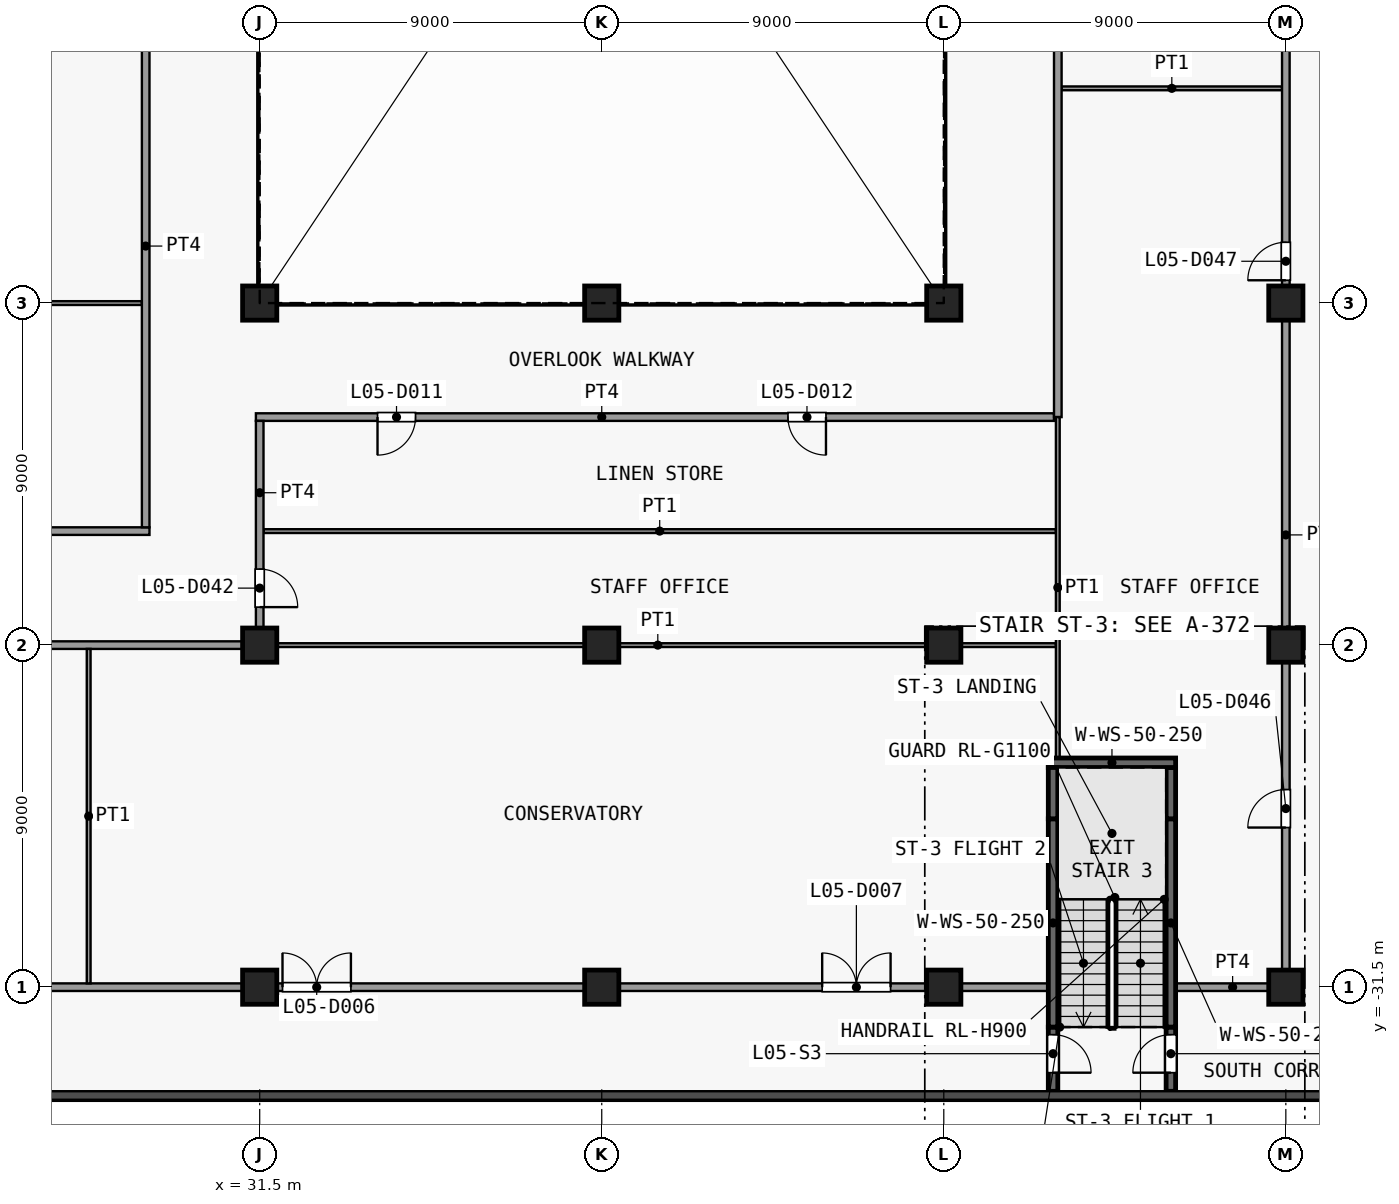
"""IFC4 building model, lengths in metres.
Left out: names, types, materials, properties, quantities, classifications, styles, units other than length and angle.
Written with IfcOpenShell. Run it as: python <this file> out.ifc"""

import sys

from ifc_helpers import new_model, si_unit, direction, frame, frame_2d, origin, origin_2d, place, context, subcontext, project, spatial, rectangle, extrude, element, fill, save


model = new_model("IFC4")
c1 = context("Model", 3, precision=1e-05, world=origin(), true_north=direction((0.0, 1.0)))
c2 = subcontext(c1, "Body", "Model", "MODEL_VIEW")
j1 = project(units=[si_unit("LENGTHUNIT", "METRE"), si_unit("PLANEANGLEUNIT", "RADIAN")], contexts=[c1])
p1 = place(None, origin())
s1 = spatial("IfcSite", under=j1, at=p1, CompositionType="ELEMENT")
p2 = place(p1, origin())
s2 = spatial("IfcBuilding", under=s1, at=p2, CompositionType="ELEMENT")
p3 = place(p2, frame((0.0, 0.0, 28.0)))
s3 = spatial("IfcBuildingStorey", under=s2, at=p3, CompositionType="ELEMENT", Elevation=28.0)
for number, where, z_axis, x_axis in (
    (1, (31.5, -31.5, 0.0), (0.0, 0.0, 1.0), (1.0, 0.0, 0.0)),
    (2, (31.5, -22.5, 0.0), (0.0, 0.0, 1.0), (1.0, 0.0, 0.0)),
    (3, (31.5, -13.5, 0.0), (0.0, 0.0, 1.0), (1.0, 0.0, 0.0)),
    (4, (40.5, -31.5, 0.0), (0.0, 0.0, 1.0), (1.0, 0.0, 0.0)),
    (5, (40.5, -22.5, 0.0), (0.0, 0.0, 1.0), (1.0, 0.0, 0.0)),
    (6, (40.5, -13.5, 0.0), (0.0, 0.0, 1.0), (1.0, 0.0, 0.0)),
    (7, (49.5, -31.5, 0.0), (0.0, 0.0, 1.0), (1.0, 0.0, 0.0)),
    (8, (49.5, -22.5, 0.0), (0.0, 0.0, 1.0), (1.0, 0.0, 0.0)),
    (9, (49.5, -13.5, 0.0), (0.0, 0.0, 1.0), (1.0, 0.0, 0.0)),
    (10, (58.5, -31.5, 0.0), (0.0, 0.0, 1.0), (1.0, 0.0, 0.0)),
    (11, (58.5, -22.5, 0.0), (0.0, 0.0, 1.0), (1.0, 0.0, 0.0)),
    (12, (58.5, -13.5, 0.0), (0.0, 0.0, 1.0), (1.0, 0.0, 0.0)),
):
    element("IfcColumn", number, at=place(p3, frame(where, z_axis=z_axis, x_axis=x_axis)), inside=s3, PredefinedType="COLUMN", context=c2, shape_type="SweptSolid", body=[
        extrude(rectangle(XDim=0.9, YDim=0.9, at=origin_2d()), origin(), (0.0, 0.0, 1.0), 4.5),
    ])
p4 = place(p3, frame((52.375, -32.55, 0.0), z_axis=(0.0, 0.0, 1.0), x_axis=(0.0, -1.0, 0.0)))
e13 = element("IfcWall", 13, at=p4, inside=s3, PredefinedType="SHEAR", context=c2, shape_type="SweptSolid", body=[
    extrude(rectangle(XDim=1.69, YDim=0.25, at=frame_2d((0.845, 0.0))), origin(), (0.0, 0.0, 1.0), 4.1),
])
p5 = place(p4, frame((0.2, 0.0, 0.0)))
e14 = element("IfcOpeningElement", 14, at=p5, cuts=e13, PredefinedType="OPENING", context=c2, shape_type="SweptSolid", body=[
    extrude(rectangle(XDim=1.0, YDim=2.1, at=frame_2d((0.5, 1.05))), frame((0.0, 0.135, 0.0), z_axis=(0.0, -1.0, 0.0), x_axis=(1.0, 0.0, 0.0)), (0.0, 0.0, 1.0), 0.27),
])
p6 = place(p3, frame((52.375, -32.55, 0.0), z_axis=(0.0, 0.0, 1.0), x_axis=(0.0, 1.0, 0.0)))
e15 = element("IfcWall", 15, at=p6, inside=s3, PredefinedType="SHEAR", context=c2, shape_type="SweptSolid", body=[
    extrude(rectangle(XDim=5.48, YDim=0.25, at=frame_2d((2.74, 0.0))), origin(), (0.0, 0.0, 1.0), 4.1),
])
p7 = place(p3, frame((52.375, -27.07, 0.0), z_axis=(0.0, 0.0, 1.0), x_axis=(0.0, 1.0, 0.0)))
e16 = element("IfcWall", 16, at=p7, inside=s3, PredefinedType="SHEAR", context=c2, shape_type="SweptSolid", body=[
    extrude(rectangle(XDim=1.35, YDim=0.25, at=frame_2d((0.675, 0.0))), origin(), (0.0, 0.0, 1.0), 4.1),
])
p8 = place(p3, frame((55.475, -34.24, 0.0), z_axis=(0.0, 0.0, 1.0), x_axis=(0.0, 1.0, 0.0)))
e17 = element("IfcWall", 17, at=p8, inside=s3, PredefinedType="SHEAR", context=c2, shape_type="SweptSolid", body=[
    extrude(rectangle(XDim=1.69, YDim=0.25, at=frame_2d((0.845, 0.0))), origin(), (0.0, 0.0, 1.0), 4.1),
])
p9 = place(p8, frame((0.49, 0.0, 0.0)))
e18 = element("IfcOpeningElement", 18, at=p9, cuts=e17, PredefinedType="OPENING", context=c2, shape_type="SweptSolid", body=[
    extrude(rectangle(XDim=1.0, YDim=2.1, at=frame_2d((0.5, 1.05))), frame((0.0, 0.135, 0.0), z_axis=(0.0, -1.0, 0.0), x_axis=(1.0, 0.0, 0.0)), (0.0, 0.0, 1.0), 0.27),
])
p10 = place(p3, frame((55.475, -32.55, 0.0), z_axis=(0.0, 0.0, 1.0), x_axis=(0.0, 1.0, 0.0)))
e19 = element("IfcWall", 19, at=p10, inside=s3, PredefinedType="SHEAR", context=c2, shape_type="SweptSolid", body=[
    extrude(rectangle(XDim=5.48, YDim=0.25, at=frame_2d((2.74, 0.0))), origin(), (0.0, 0.0, 1.0), 4.1),
])
p11 = place(p3, frame((55.475, -27.07, 0.0), z_axis=(0.0, 0.0, 1.0), x_axis=(0.0, 1.0, 0.0)))
e20 = element("IfcWall", 20, at=p11, inside=s3, PredefinedType="SHEAR", context=c2, shape_type="SweptSolid", body=[
    extrude(rectangle(XDim=1.35, YDim=0.25, at=frame_2d((0.675, 0.0))), origin(), (0.0, 0.0, 1.0), 4.1),
])
p12 = place(p3, frame((52.25, -25.595, 0.0), z_axis=(0.0, 0.0, 1.0), x_axis=(1.0, 0.0, 0.0)))
e21 = element("IfcWall", 21, at=p12, inside=s3, PredefinedType="SHEAR", context=c2, shape_type="SweptSolid", body=[
    extrude(rectangle(XDim=3.35, YDim=0.25, at=frame_2d((1.675, 0.0))), origin(), (0.0, 0.0, 1.0), 4.1),
])
p13 = place(p3, frame((-25.9, -31.5, 0.0), z_axis=(0.0, 0.0, 1.0), x_axis=(1.0, 0.0, 0.0)))
e22 = element("IfcWall", 22, at=p13, inside=s3, PredefinedType="PARTITIONING", context=c2, shape_type="SweptSolid", body=[
    extrude(rectangle(XDim=78.15, YDim=0.2, at=frame_2d((39.075, 0.0))), origin(), (0.0, 0.0, 1.0), 4.1),
])
p14 = place(p13, frame((5.1, 0.0, 0.0)))
e23 = element("IfcOpeningElement", 23, at=p14, cuts=e22, PredefinedType="OPENING", context=c2, shape_type="SweptSolid", body=[
    extrude(rectangle(XDim=1.0, YDim=2.1, at=frame_2d((0.5, 1.05))), frame((0.0, 0.11, 0.0), z_axis=(0.0, -1.0, 0.0), x_axis=(1.0, 0.0, 0.0)), (0.0, 0.0, 1.0), 0.22),
])
p15 = place(p13, frame((22.0, 0.0, 0.0)))
e24 = element("IfcOpeningElement", 24, at=p15, cuts=e22, PredefinedType="OPENING", context=c2, shape_type="SweptSolid", body=[
    extrude(rectangle(XDim=1.0, YDim=2.1, at=frame_2d((0.5, 1.05))), frame((0.0, 0.11, 0.0), z_axis=(0.0, -1.0, 0.0), x_axis=(1.0, 0.0, 0.0)), (0.0, 0.0, 1.0), 0.22),
])
p16 = place(p13, frame((31.0, 0.0, 0.0)))
e25 = element("IfcOpeningElement", 25, at=p16, cuts=e22, PredefinedType="OPENING", context=c2, shape_type="SweptSolid", body=[
    extrude(rectangle(XDim=1.0, YDim=2.1, at=frame_2d((0.5, 1.05))), frame((0.0, 0.11, 0.0), z_axis=(0.0, -1.0, 0.0), x_axis=(1.0, 0.0, 0.0)), (0.0, 0.0, 1.0), 0.22),
])
p17 = place(p13, frame((34.8, 0.0, 0.0)))
e26 = element("IfcOpeningElement", 26, at=p17, cuts=e22, PredefinedType="OPENING", context=c2, shape_type="SweptSolid", body=[
    extrude(rectangle(XDim=1.0, YDim=2.1, at=frame_2d((0.5, 1.05))), frame((0.0, 0.11, 0.0), z_axis=(0.0, -1.0, 0.0), x_axis=(1.0, 0.0, 0.0)), (0.0, 0.0, 1.0), 0.22),
])
p18 = place(p13, frame((45.1, 0.0, 0.0)))
e27 = element("IfcOpeningElement", 27, at=p18, cuts=e22, PredefinedType="OPENING", context=c2, shape_type="SweptSolid", body=[
    extrude(rectangle(XDim=1.0, YDim=2.1, at=frame_2d((0.5, 1.05))), frame((0.0, 0.11, 0.0), z_axis=(0.0, -1.0, 0.0), x_axis=(1.0, 0.0, 0.0)), (0.0, 0.0, 1.0), 0.22),
])
p19 = place(p13, frame((58.0, 0.0, 0.0)))
e28 = element("IfcOpeningElement", 28, at=p19, cuts=e22, PredefinedType="OPENING", context=c2, shape_type="SweptSolid", body=[
    extrude(rectangle(XDim=1.8, YDim=2.1, at=frame_2d((0.9, 1.05))), frame((0.0, 0.11, 0.0), z_axis=(0.0, -1.0, 0.0), x_axis=(1.0, 0.0, 0.0)), (0.0, 0.0, 1.0), 0.22),
])
p20 = place(p13, frame((72.2, 0.0, 0.0)))
e29 = element("IfcOpeningElement", 29, at=p20, cuts=e22, PredefinedType="OPENING", context=c2, shape_type="SweptSolid", body=[
    extrude(rectangle(XDim=1.8, YDim=2.1, at=frame_2d((0.9, 1.05))), frame((0.0, 0.11, 0.0), z_axis=(0.0, -1.0, 0.0), x_axis=(1.0, 0.0, 0.0)), (0.0, 0.0, 1.0), 0.22),
])
p21 = place(p3, frame((55.6, -31.5, 0.0), z_axis=(0.0, 0.0, 1.0), x_axis=(1.0, 0.0, 0.0)))
e30 = element("IfcWall", 30, at=p21, inside=s3, PredefinedType="PARTITIONING", context=c2, shape_type="SweptSolid", body=[
    extrude(rectangle(XDim=3.0, YDim=0.2, at=frame_2d((1.5, 0.0))), origin(), (0.0, 0.0, 1.0), 4.1),
])
p22 = place(p3, frame((17.4, -22.5, 0.0), z_axis=(0.0, 0.0, 1.0), x_axis=(1.0, 0.0, 0.0)))
e31 = element("IfcWall", 31, at=p22, inside=s3, PredefinedType="PARTITIONING", context=c2, shape_type="SweptSolid", body=[
    extrude(rectangle(XDim=14.1, YDim=0.2, at=frame_2d((7.05, 0.0))), origin(), (0.0, 0.0, 1.0), 4.1),
])
p23 = place(p3, frame((31.5, -22.5, 0.0), z_axis=(0.0, 0.0, 1.0), x_axis=(1.0, 0.0, 0.0)))
e32 = element("IfcWall", 32, at=p23, inside=s3, PredefinedType="PARTITIONING", context=c2, shape_type="SweptSolid", body=[
    extrude(rectangle(XDim=20.95, YDim=0.1, at=frame_2d((10.475, 0.0))), origin(), (0.0, 0.0, 1.0), 4.1),
])
p24 = place(p3, frame((13.5, -19.5, 0.0), z_axis=(0.0, 0.0, 1.0), x_axis=(1.0, 0.0, 0.0)))
e33 = element("IfcWall", 33, at=p24, inside=s3, PredefinedType="PARTITIONING", context=c2, shape_type="SweptSolid", body=[
    extrude(rectangle(XDim=15.1, YDim=0.2, at=frame_2d((7.55, 0.0))), origin(), (0.0, 0.0, 1.0), 4.1),
])
p25 = place(p24, frame((7.0, 0.0, 0.0)))
e34 = element("IfcOpeningElement", 34, at=p25, cuts=e33, PredefinedType="OPENING", context=c2, shape_type="SweptSolid", body=[
    extrude(rectangle(XDim=1.0, YDim=2.1, at=frame_2d((0.5, 1.05))), frame((0.0, 0.11, 0.0), z_axis=(0.0, -1.0, 0.0), x_axis=(1.0, 0.0, 0.0)), (0.0, 0.0, 1.0), 0.22),
])
p26 = place(p3, frame((31.6, -19.5, 0.0), z_axis=(0.0, 0.0, 1.0), x_axis=(1.0, 0.0, 0.0)))
e35 = element("IfcWall", 35, at=p26, inside=s3, PredefinedType="PARTITIONING", context=c2, shape_type="SweptSolid", body=[
    extrude(rectangle(XDim=20.85, YDim=0.1, at=frame_2d((10.425, 0.0))), origin(), (0.0, 0.0, 1.0), 4.1),
])
p27 = place(p3, frame((31.4, -16.5, 0.0), z_axis=(0.0, 0.0, 1.0), x_axis=(1.0, 0.0, 0.0)))
e36 = element("IfcWall", 36, at=p27, inside=s3, PredefinedType="PARTITIONING", context=c2, shape_type="SweptSolid", body=[
    extrude(rectangle(XDim=21.0, YDim=0.2, at=frame_2d((10.5, 0.0))), origin(), (0.0, 0.0, 1.0), 4.1),
])
p28 = place(p27, frame((3.2, 0.0, 0.0)))
e37 = element("IfcOpeningElement", 37, at=p28, cuts=e36, PredefinedType="OPENING", context=c2, shape_type="SweptSolid", body=[
    extrude(rectangle(XDim=1.0, YDim=2.1, at=frame_2d((0.5, 1.05))), frame((0.0, 0.11, 0.0), z_axis=(0.0, -1.0, 0.0), x_axis=(1.0, 0.0, 0.0)), (0.0, 0.0, 1.0), 0.22),
])
p29 = place(p27, frame((14.0, 0.0, 0.0)))
e38 = element("IfcOpeningElement", 38, at=p29, cuts=e36, PredefinedType="OPENING", context=c2, shape_type="SweptSolid", body=[
    extrude(rectangle(XDim=1.0, YDim=2.1, at=frame_2d((0.5, 1.05))), frame((0.0, 0.11, 0.0), z_axis=(0.0, -1.0, 0.0), x_axis=(1.0, 0.0, 0.0)), (0.0, 0.0, 1.0), 0.22),
])
p30 = place(p3, frame((13.5, -13.5, 0.0), z_axis=(0.0, 0.0, 1.0), x_axis=(1.0, 0.0, 0.0)))
e39 = element("IfcWall", 39, at=p30, inside=s3, PredefinedType="PARTITIONING", context=c2, shape_type="SweptSolid", body=[
    extrude(rectangle(XDim=14.9, YDim=0.1, at=frame_2d((7.45, 0.0))), origin(), (0.0, 0.0, 1.0), 4.1),
])
p31 = place(p3, frame((52.6, -7.85, 0.0), z_axis=(0.0, 0.0, 1.0), x_axis=(1.0, 0.0, 0.0)))
e40 = element("IfcWall", 40, at=p31, inside=s3, PredefinedType="PARTITIONING", context=c2, shape_type="SweptSolid", body=[
    extrude(rectangle(XDim=5.8, YDim=0.1, at=frame_2d((2.9, 0.0))), origin(), (0.0, 0.0, 1.0), 4.1),
])
p32 = place(p3, frame((27.0, -31.4, 0.0), z_axis=(0.0, 0.0, 1.0), x_axis=(0.0, 1.0, 0.0)))
e41 = element("IfcWall", 41, at=p32, inside=s3, PredefinedType="PARTITIONING", context=c2, shape_type="SweptSolid", body=[
    extrude(rectangle(XDim=8.8, YDim=0.1, at=frame_2d((4.4, 0.0))), origin(), (0.0, 0.0, 1.0), 4.1),
])
p33 = place(p3, frame((28.5, -19.4, 0.0), z_axis=(0.0, 0.0, 1.0), x_axis=(0.0, 1.0, 0.0)))
e42 = element("IfcWall", 42, at=p33, inside=s3, PredefinedType="PARTITIONING", context=c2, shape_type="SweptSolid", body=[
    extrude(rectangle(XDim=14.8, YDim=0.2, at=frame_2d((7.4, 0.0))), origin(), (0.0, 0.0, 1.0), 4.1),
])
p34 = place(p3, frame((31.5, -22.4, 0.0), z_axis=(0.0, 0.0, 1.0), x_axis=(0.0, 1.0, 0.0)))
e43 = element("IfcWall", 43, at=p34, inside=s3, PredefinedType="PARTITIONING", context=c2, shape_type="SweptSolid", body=[
    extrude(rectangle(XDim=5.8, YDim=0.2, at=frame_2d((2.9, 0.0))), origin(), (0.0, 0.0, 1.0), 4.1),
])
p35 = place(p34, frame((0.9, 0.0, 0.0)))
e44 = element("IfcOpeningElement", 44, at=p35, cuts=e43, PredefinedType="OPENING", context=c2, shape_type="SweptSolid", body=[
    extrude(rectangle(XDim=1.0, YDim=2.1, at=frame_2d((0.5, 1.05))), frame((0.0, 0.11, 0.0), z_axis=(0.0, -1.0, 0.0), x_axis=(1.0, 0.0, 0.0)), (0.0, 0.0, 1.0), 0.22),
])
p36 = place(p3, frame((52.5, -16.5, 0.0), z_axis=(0.0, 0.0, 1.0), x_axis=(0.0, 1.0, 0.0)))
e45 = element("IfcWall", 45, at=p36, inside=s3, PredefinedType="PARTITIONING", context=c2, shape_type="SweptSolid", body=[
    extrude(rectangle(XDim=32.2, YDim=0.2, at=frame_2d((16.1, 0.0))), origin(), (0.0, 0.0, 1.0), 4.1),
])
p37 = place(p3, frame((52.5, -25.47, 0.0), z_axis=(0.0, 0.0, 1.0), x_axis=(0.0, 1.0, 0.0)))
e46 = element("IfcWall", 46, at=p37, inside=s3, PredefinedType="PARTITIONING", context=c2, shape_type="SweptSolid", body=[
    extrude(rectangle(XDim=8.97, YDim=0.1, at=frame_2d((4.485, 0.0))), origin(), (0.0, 0.0, 1.0), 4.1),
])
p38 = place(p3, frame((58.5, -31.4, 0.0), z_axis=(0.0, 0.0, 1.0), x_axis=(0.0, 1.0, 0.0)))
e47 = element("IfcWall", 47, at=p38, inside=s3, PredefinedType="PARTITIONING", context=c2, shape_type="SweptSolid", body=[
    extrude(rectangle(XDim=47.1, YDim=0.2, at=frame_2d((23.55, 0.0))), origin(), (0.0, 0.0, 1.0), 4.1),
])
p39 = place(p38, frame((4.1, 0.0, 0.0)))
e48 = element("IfcOpeningElement", 48, at=p39, cuts=e47, PredefinedType="OPENING", context=c2, shape_type="SweptSolid", body=[
    extrude(rectangle(XDim=1.0, YDim=2.1, at=frame_2d((0.5, 1.05))), frame((0.0, 0.11, 0.0), z_axis=(0.0, -1.0, 0.0), x_axis=(1.0, 0.0, 0.0)), (0.0, 0.0, 1.0), 0.22),
])
p40 = place(p38, frame((18.5, 0.0, 0.0)))
e49 = element("IfcOpeningElement", 49, at=p40, cuts=e47, PredefinedType="OPENING", context=c2, shape_type="SweptSolid", body=[
    extrude(rectangle(XDim=1.0, YDim=2.1, at=frame_2d((0.5, 1.05))), frame((0.0, 0.11, 0.0), z_axis=(0.0, -1.0, 0.0), x_axis=(1.0, 0.0, 0.0)), (0.0, 0.0, 1.0), 0.22),
])
p41 = place(p38, frame((27.45, 0.0, 0.0)))
e50 = element("IfcOpeningElement", 50, at=p41, cuts=e47, PredefinedType="OPENING", context=c2, shape_type="SweptSolid", body=[
    extrude(rectangle(XDim=1.8, YDim=2.1, at=frame_2d((0.9, 1.05))), frame((0.0, 0.11, 0.0), z_axis=(0.0, -1.0, 0.0), x_axis=(1.0, 0.0, 0.0)), (0.0, 0.0, 1.0), 0.22),
])
p42 = place(p38, frame((41.55, 0.0, 0.0)))
e51 = element("IfcOpeningElement", 51, at=p42, cuts=e47, PredefinedType="OPENING", context=c2, shape_type="SweptSolid", body=[
    extrude(rectangle(XDim=1.8, YDim=2.1, at=frame_2d((0.9, 1.05))), frame((0.0, 0.11, 0.0), z_axis=(0.0, -1.0, 0.0), x_axis=(1.0, 0.0, 0.0)), (0.0, 0.0, 1.0), 0.22),
])
p43 = place(p5, origin())
e52 = element("IfcDoor", 52, at=p43, inside=s3, OperationType="SINGLE_SWING_RIGHT", PredefinedType="DOOR", context=c2, shape_type="SweptSolid", body=[
    extrude(rectangle(XDim=1.0, YDim=2.1, at=frame_2d((0.5, 1.05))), frame((0.0, 0.025, 0.0), z_axis=(0.0, -1.0, 0.0), x_axis=(1.0, 0.0, 0.0)), (0.0, 0.0, 1.0), 0.05),
])
fill(e14, e52)
p44 = place(p9, origin())
e53 = element("IfcDoor", 53, at=p44, inside=s3, OperationType="SINGLE_SWING_LEFT", PredefinedType="DOOR", context=c2, shape_type="SweptSolid", body=[
    extrude(rectangle(XDim=1.0, YDim=2.1, at=frame_2d((0.5, 1.05))), frame((0.0, 0.025, 0.0), z_axis=(0.0, -1.0, 0.0), x_axis=(1.0, 0.0, 0.0)), (0.0, 0.0, 1.0), 0.05),
])
fill(e18, e53)
p45 = place(p19, origin())
e54 = element("IfcDoor", 54, at=p45, inside=s3, OperationType="DOUBLE_DOOR_SINGLE_SWING", PredefinedType="DOOR", context=c2, shape_type="SweptSolid", body=[
    extrude(rectangle(XDim=1.8, YDim=2.1, at=frame_2d((0.9, 1.05))), frame((0.0, 0.025, 0.0), z_axis=(0.0, -1.0, 0.0), x_axis=(1.0, 0.0, 0.0)), (0.0, 0.0, 1.0), 0.05),
])
fill(e28, e54)
p46 = place(p20, origin())
e55 = element("IfcDoor", 55, at=p46, inside=s3, OperationType="DOUBLE_DOOR_SINGLE_SWING", PredefinedType="DOOR", context=c2, shape_type="SweptSolid", body=[
    extrude(rectangle(XDim=1.8, YDim=2.1, at=frame_2d((0.9, 1.05))), frame((0.0, 0.025, 0.0), z_axis=(0.0, -1.0, 0.0), x_axis=(1.0, 0.0, 0.0)), (0.0, 0.0, 1.0), 0.05),
])
fill(e29, e55)
p47 = place(p28, origin())
e56 = element("IfcDoor", 56, at=p47, inside=s3, OperationType="SINGLE_SWING_LEFT", PredefinedType="DOOR", context=c2, shape_type="SweptSolid", body=[
    extrude(rectangle(XDim=1.0, YDim=2.1, at=frame_2d((0.5, 1.05))), frame((0.0, 0.025, 0.0), z_axis=(0.0, -1.0, 0.0), x_axis=(1.0, 0.0, 0.0)), (0.0, 0.0, 1.0), 0.05),
])
fill(e37, e56)
p48 = place(p29, origin())
e57 = element("IfcDoor", 57, at=p48, inside=s3, OperationType="SINGLE_SWING_RIGHT", PredefinedType="DOOR", context=c2, shape_type="SweptSolid", body=[
    extrude(rectangle(XDim=1.0, YDim=2.1, at=frame_2d((0.5, 1.05))), frame((0.0, 0.025, 0.0), z_axis=(0.0, -1.0, 0.0), x_axis=(1.0, 0.0, 0.0)), (0.0, 0.0, 1.0), 0.05),
])
fill(e38, e57)
p49 = place(p35, origin())
e58 = element("IfcDoor", 58, at=p49, inside=s3, OperationType="SINGLE_SWING_LEFT", PredefinedType="DOOR", context=c2, shape_type="SweptSolid", body=[
    extrude(rectangle(XDim=1.0, YDim=2.1, at=frame_2d((0.5, 1.05))), frame((0.0, 0.025, 0.0), z_axis=(0.0, -1.0, 0.0), x_axis=(1.0, 0.0, 0.0)), (0.0, 0.0, 1.0), 0.05),
])
fill(e44, e58)
p50 = place(p39, origin())
e59 = element("IfcDoor", 59, at=p50, inside=s3, OperationType="SINGLE_SWING_RIGHT", PredefinedType="DOOR", context=c2, shape_type="SweptSolid", body=[
    extrude(rectangle(XDim=1.0, YDim=2.1, at=frame_2d((0.5, 1.05))), frame((0.0, 0.025, 0.0), z_axis=(0.0, -1.0, 0.0), x_axis=(1.0, 0.0, 0.0)), (0.0, 0.0, 1.0), 0.05),
])
fill(e48, e59)
p51 = place(p40, origin())
e60 = element("IfcDoor", 60, at=p51, inside=s3, OperationType="SINGLE_SWING_RIGHT", PredefinedType="DOOR", context=c2, shape_type="SweptSolid", body=[
    extrude(rectangle(XDim=1.0, YDim=2.1, at=frame_2d((0.5, 1.05))), frame((0.0, 0.025, 0.0), z_axis=(0.0, -1.0, 0.0), x_axis=(1.0, 0.0, 0.0)), (0.0, 0.0, 1.0), 0.05),
])
fill(e49, e60)
save(model, sys.argv[1])
